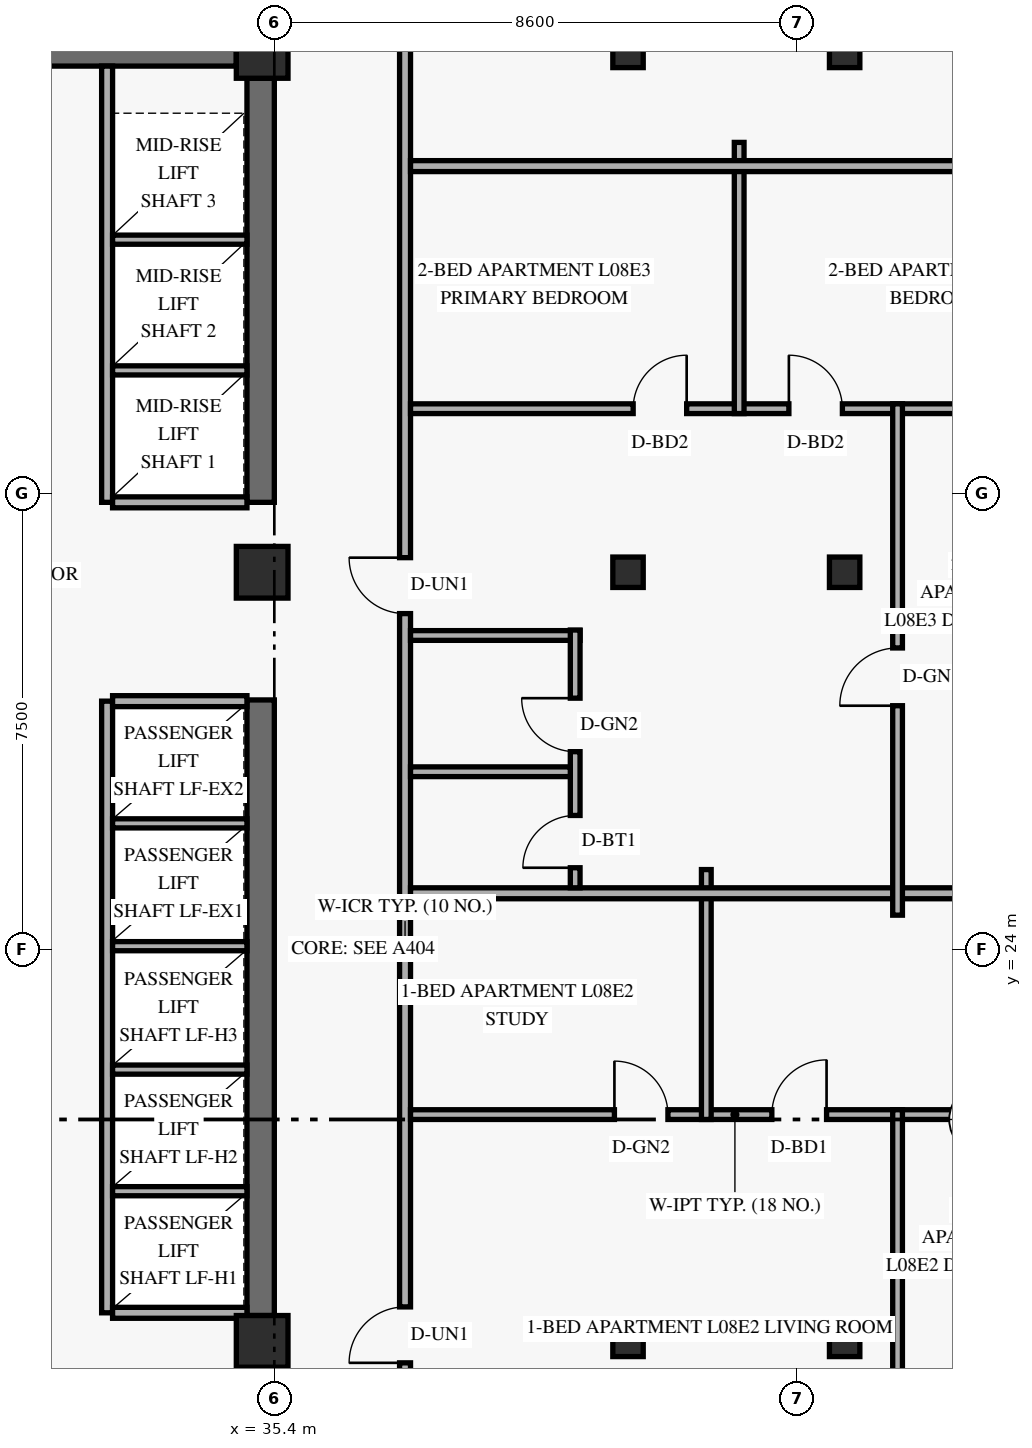
"""IFC4 building model, lengths in metres.
Left out: names, types, materials, properties, quantities, classifications, styles, units other than length and angle.
Written with IfcOpenShell. Run it as: python <this file> out.ifc"""

import sys

from ifc_helpers import new_model, si_unit, direction, frame, frame_2d, origin, origin_2d, place, context, subcontext, project, spatial, rectangle, hollow_rectangle, extrude, element, fill, save


model = new_model("IFC4")
c1 = context("Model", 3, precision=1e-05, world=origin(), true_north=direction((0.0, 1.0)))
c2 = subcontext(c1, "Body", "Model", "MODEL_VIEW")
j1 = project(units=[si_unit("LENGTHUNIT", "METRE"), si_unit("PLANEANGLEUNIT", "RADIAN")], contexts=[c1])
p1 = place(None, origin())
s1 = spatial("IfcSite", under=j1, at=p1, CompositionType="ELEMENT")
p2 = place(p1, origin())
s2 = spatial("IfcBuilding", under=s1, at=p2, CompositionType="ELEMENT")
p3 = place(p2, frame((0.0, 0.0, 34.8)))
s3 = spatial("IfcBuildingStorey", under=s2, at=p3, CompositionType="ELEMENT", Elevation=34.8)
p4 = place(p3, frame((35.175, 17.975, 0.0), z_axis=(0.0, 0.0, 1.0), x_axis=(0.0, 1.0, 0.0)))
e1 = element("IfcWall", 1, at=p4, inside=s3, PredefinedType="SHEAR", context=c2, shape_type="SweptSolid", body=[
    extrude(rectangle(XDim=10.125, YDim=0.45, at=frame_2d((5.062, 0.0))), origin(), (0.0, 0.0, 1.0), 2.667),
])
p5 = place(p3, frame((35.175, 31.35, 0.0), z_axis=(0.0, 0.0, 1.0), x_axis=(0.0, 1.0, 0.0)))
e2 = element("IfcWall", 2, at=p5, inside=s3, PredefinedType="SHEAR", context=c2, shape_type="SweptSolid", body=[
    extrude(rectangle(XDim=6.975, YDim=0.45, at=frame_2d((3.487, 0.0))), origin(), (0.0, 0.0, 1.0), 2.667),
])
p6 = place(p3, frame((24.625, 38.75, 0.0), z_axis=(0.0, 0.0, 1.0), x_axis=(1.0, 0.0, 0.0)))
e3 = element("IfcWall", 3, at=p6, inside=s3, PredefinedType="SHEAR", context=c2, shape_type="SweptSolid", body=[
    extrude(rectangle(XDim=10.15, YDim=0.45, at=frame_2d((5.075, 0.0))), origin(), (0.0, 0.0, 1.0), 3.36),
])
for number, where, z_axis, x_axis in (
    (4, (35.2, 17.55, 0.0), (0.0, 0.0, 1.0), (1.0, 0.0, 0.0)),
    (5, (35.2, 30.2, 0.0), (0.0, 0.0, 1.0), (1.0, 0.0, 0.0)),
    (6, (35.2, 38.75, 0.0), (0.0, 0.0, 1.0), (1.0, 0.0, 0.0)),
):
    element("IfcColumn", number, at=place(p3, frame(where, z_axis=z_axis, x_axis=x_axis)), inside=s3, PredefinedType="COLUMN", context=c2, shape_type="SweptSolid", body=[
        extrude(rectangle(XDim=0.85, YDim=0.85, at=origin_2d()), origin(), (0.0, 0.0, 1.0), 3.6),
    ])
for number, where, z_axis, x_axis in (
    (7, (41.154, 17.55, 0.0), (0.035, 0.0, 0.999), (0.0, 1.0, 0.0)),
    (8, (41.154, 30.2, 0.0), (0.035, 0.0, 0.999), (0.0, 1.0, 0.0)),
    (9, (41.154, 38.75, 0.0), (0.035, 0.0, 0.999), (0.0, 1.0, 0.0)),
):
    element("IfcColumn", number, at=place(p3, frame(where, z_axis=z_axis, x_axis=x_axis)), inside=s3, PredefinedType="COLUMN", context=c2, shape_type="SweptSolid", body=[
        extrude(hollow_rectangle(XDim=0.5, YDim=0.5, WallThickness=0.022, at=origin_2d()), origin(), (0.0, 0.0, 1.0), 3.602),
    ])
for number, where, z_axis, x_axis in (
    (10, (44.675, 17.55, 0.0), (0.058, 0.0, 0.998), (0.0, 1.0, 0.0)),
    (11, (44.675, 30.2, 0.0), (0.058, 0.0, 0.998), (0.0, 1.0, 0.0)),
    (12, (44.675, 38.75, 0.0), (0.058, 0.0, 0.998), (0.0, 1.0, 0.0)),
):
    element("IfcColumn", number, at=place(p3, frame(where, z_axis=z_axis, x_axis=x_axis)), inside=s3, PredefinedType="COLUMN", context=c2, shape_type="SweptSolid", body=[
        extrude(hollow_rectangle(XDim=0.5, YDim=0.5, WallThickness=0.022, at=origin_2d()), origin(), (0.0, 0.0, 1.0), 3.606),
    ])
p7 = place(p3, frame((32.65, 18.02, 0.0), z_axis=(0.0, 0.0, 1.0), x_axis=(0.0, 1.0, 0.0)))
e13 = element("IfcWall", 13, at=p7, inside=s3, PredefinedType="STANDARD", context=c2, shape_type="SweptSolid", body=[
    extrude(rectangle(XDim=10.06, YDim=0.18, at=frame_2d((5.03, 0.0))), origin(), (0.0, 0.0, 1.0), 3.36),
])
for number, where, z_axis, x_axis in (
    (14, (32.74, 18.02, 0.0), (0.0, 0.0, 1.0), (1.0, 0.0, 0.0)),
    (15, (32.74, 28.08, 0.0), (0.0, 0.0, 1.0), (1.0, 0.0, 0.0)),
):
    element("IfcWall", number, at=place(p3, frame(where, z_axis=z_axis, x_axis=x_axis)), inside=s3, PredefinedType="STANDARD", context=c2, shape_type="SweptSolid", body=[
        extrude(rectangle(XDim=2.21, YDim=0.18, at=frame_2d((1.105, 0.0))), origin(), (0.0, 0.0, 1.0), 3.36),
    ])
for number, where, z_axis, x_axis in (
    (16, (32.74, 20.02, 0.0), (0.0, 0.0, 1.0), (1.0, 0.0, 0.0)),
    (17, (32.74, 22.02, 0.0), (0.0, 0.0, 1.0), (1.0, 0.0, 0.0)),
    (18, (32.74, 24.05, 0.0), (0.0, 0.0, 1.0), (1.0, 0.0, 0.0)),
    (19, (32.74, 26.07, 0.0), (0.0, 0.0, 1.0), (1.0, 0.0, 0.0)),
):
    element("IfcWall", number, at=place(p3, frame(where, z_axis=z_axis, x_axis=x_axis)), inside=s3, PredefinedType="STANDARD", context=c2, shape_type="SweptSolid", body=[
        extrude(rectangle(XDim=2.21, YDim=0.15, at=frame_2d((1.105, 0.0))), origin(), (0.0, 0.0, 1.0), 3.36),
    ])
p8 = place(p3, frame((32.65, 31.35, 0.0), z_axis=(0.0, 0.0, 1.0), x_axis=(0.0, 1.0, 0.0)))
e20 = element("IfcWall", 20, at=p8, inside=s3, PredefinedType="STANDARD", context=c2, shape_type="SweptSolid", body=[
    extrude(rectangle(XDim=7.175, YDim=0.18, at=frame_2d((3.587, 0.0))), origin(), (0.0, 0.0, 1.0), 3.36),
])
p9 = place(p3, frame((32.74, 31.35, 0.0), z_axis=(0.0, 0.0, 1.0), x_axis=(1.0, 0.0, 0.0)))
e21 = element("IfcWall", 21, at=p9, inside=s3, PredefinedType="STANDARD", context=c2, shape_type="SweptSolid", body=[
    extrude(rectangle(XDim=2.21, YDim=0.18, at=frame_2d((1.105, 0.0))), origin(), (0.0, 0.0, 1.0), 3.36),
])
for number, where, z_axis, x_axis in (
    (22, (32.74, 33.52, 0.0), (0.0, 0.0, 1.0), (1.0, 0.0, 0.0)),
    (23, (32.74, 35.67, 0.0), (0.0, 0.0, 1.0), (1.0, 0.0, 0.0)),
):
    element("IfcWall", number, at=place(p3, frame(where, z_axis=z_axis, x_axis=x_axis)), inside=s3, PredefinedType="STANDARD", context=c2, shape_type="SweptSolid", body=[
        extrude(rectangle(XDim=2.21, YDim=0.15, at=frame_2d((1.105, 0.0))), origin(), (0.0, 0.0, 1.0), 3.36),
    ])
p10 = place(p3, frame((37.55, 1.29, 0.0), z_axis=(0.0, 0.0, 1.0), x_axis=(0.0, 1.0, 0.0)))
e24 = element("IfcWall", 24, at=p10, inside=s3, PredefinedType="STANDARD", context=c2, shape_type="SweptSolid", body=[
    extrude(rectangle(XDim=45.42, YDim=0.18, at=frame_2d((22.71, 0.0))), origin(), (0.0, 0.0, 1.0), 2.649),
])
p11 = place(p10, frame((4.46, 0.0, 0.0)))
e25 = element("IfcOpeningElement", 25, at=p11, cuts=e24, PredefinedType="OPENING", context=c2, shape_type="SweptSolid", body=[
    extrude(rectangle(XDim=0.92, YDim=2.15, at=frame_2d((0.46, 1.075))), frame((0.0, 0.1, 0.0), z_axis=(0.0, -1.0, 0.0), x_axis=(1.0, 0.0, 0.0)), (0.0, 0.0, 1.0), 0.2),
])
p12 = place(p10, frame((15.907, 0.0, 0.0)))
e26 = element("IfcOpeningElement", 26, at=p12, cuts=e24, PredefinedType="OPENING", context=c2, shape_type="SweptSolid", body=[
    extrude(rectangle(XDim=0.92, YDim=2.15, at=frame_2d((0.46, 1.075))), frame((0.0, 0.1, 0.0), z_axis=(0.0, -1.0, 0.0), x_axis=(1.0, 0.0, 0.0)), (0.0, 0.0, 1.0), 0.2),
])
p13 = place(p10, frame((28.23, 0.0, 0.0)))
e27 = element("IfcOpeningElement", 27, at=p13, cuts=e24, PredefinedType="OPENING", context=c2, shape_type="SweptSolid", body=[
    extrude(rectangle(XDim=0.92, YDim=2.15, at=frame_2d((0.46, 1.075))), frame((0.0, 0.1, 0.0), z_axis=(0.0, -1.0, 0.0), x_axis=(1.0, 0.0, 0.0)), (0.0, 0.0, 1.0), 0.2),
])
p14 = place(p10, frame((40.02, 0.0, 0.0)))
e28 = element("IfcOpeningElement", 28, at=p14, cuts=e24, PredefinedType="OPENING", context=c2, shape_type="SweptSolid", body=[
    extrude(rectangle(XDim=0.92, YDim=2.15, at=frame_2d((0.46, 1.075))), frame((0.0, 0.1, 0.0), z_axis=(0.0, -1.0, 0.0), x_axis=(1.0, 0.0, 0.0)), (0.0, 0.0, 1.0), 0.2),
])
p15 = place(p3, frame((35.42, 38.75, 0.0), z_axis=(0.0, 0.0, 1.0), x_axis=(0.0, 1.0, 0.0)))
e29 = element("IfcWall", 29, at=p15, inside=s3, PredefinedType="STANDARD", context=c2, shape_type="SweptSolid", body=[
    extrude(rectangle(XDim=0.51, YDim=0.18, at=frame_2d((0.255, 0.0))), origin(), (0.0, 0.0, 1.0), 3.36),
])
p16 = place(p3, frame((37.64, 21.28, 0.0), z_axis=(0.0, 0.0, 1.0), x_axis=(1.0, 0.0, 0.0)))
e30 = element("IfcWall", 30, at=p16, inside=s3, PredefinedType="PARTITIONING", context=c2, shape_type="SweptSolid", body=[
    extrude(rectangle(XDim=10.67, YDim=0.16, at=frame_2d((5.335, 0.0))), origin(), (0.0, 0.0, 1.0), 2.649),
])
p17 = place(p16, frame((3.353, 0.0, 0.0)))
e31 = element("IfcOpeningElement", 31, at=p17, cuts=e30, PredefinedType="OPENING", context=c2, shape_type="SweptSolid", body=[
    extrude(rectangle(XDim=0.88, YDim=2.12, at=frame_2d((0.44, 1.06))), frame((0.0, 0.09, 0.0), z_axis=(0.0, -1.0, 0.0), x_axis=(1.0, 0.0, 0.0)), (0.0, 0.0, 1.0), 0.18),
])
p18 = place(p16, frame((5.942, 0.0, 0.0)))
e32 = element("IfcOpeningElement", 32, at=p18, cuts=e30, PredefinedType="OPENING", context=c2, shape_type="SweptSolid", body=[
    extrude(rectangle(XDim=0.9, YDim=2.14, at=frame_2d((0.45, 1.07))), frame((0.0, 0.09, 0.0), z_axis=(0.0, -1.0, 0.0), x_axis=(1.0, 0.0, 0.0)), (0.0, 0.0, 1.0), 0.18),
])
p19 = place(p3, frame((45.65, 11.68, 0.0), z_axis=(0.0, 0.0, 1.0), x_axis=(0.0, 1.0, 0.0)))
e33 = element("IfcWall", 33, at=p19, inside=s3, PredefinedType="PARTITIONING", context=c2, shape_type="SweptSolid", body=[
    extrude(rectangle(XDim=9.68, YDim=0.16, at=frame_2d((4.84, 0.0))), origin(), (0.0, 0.0, 1.0), 3.36),
])
p20 = place(p19, frame((4.08, 0.0, 0.0)))
e34 = element("IfcOpeningElement", 34, at=p20, cuts=e33, PredefinedType="OPENING", context=c2, shape_type="SweptSolid", body=[
    extrude(rectangle(XDim=0.95, YDim=2.15, at=frame_2d((0.475, 1.075))), frame((0.0, 0.09, 0.0), z_axis=(0.0, -1.0, 0.0), x_axis=(1.0, 0.0, 0.0)), (0.0, 0.0, 1.0), 0.18),
])
p21 = place(p3, frame((42.504, 21.2, 0.0), z_axis=(0.0, 0.0, 1.0), x_axis=(0.0, 1.0, 0.0)))
e35 = element("IfcWall", 35, at=p21, inside=s3, PredefinedType="PARTITIONING", context=c2, shape_type="SweptSolid", body=[
    extrude(rectangle(XDim=4.11, YDim=0.16, at=frame_2d((2.055, 0.0))), origin(), (0.0, 0.0, 1.0), 2.932),
])
p22 = place(p3, frame((37.64, 24.92, 0.0), z_axis=(0.0, 0.0, 1.0), x_axis=(1.0, 0.0, 0.0)))
e36 = element("IfcWall", 36, at=p22, inside=s3, PredefinedType="PARTITIONING", context=c2, shape_type="SweptSolid", body=[
    extrude(rectangle(XDim=10.67, YDim=0.18, at=frame_2d((5.335, 0.0))), origin(), (0.0, 0.0, 1.0), 2.649),
])
p23 = place(p3, frame((37.64, 32.89, 0.0), z_axis=(0.0, 0.0, 1.0), x_axis=(1.0, 0.0, 0.0)))
e37 = element("IfcWall", 37, at=p23, inside=s3, PredefinedType="PARTITIONING", context=c2, shape_type="SweptSolid", body=[
    extrude(rectangle(XDim=10.67, YDim=0.16, at=frame_2d((5.335, 0.0))), origin(), (0.0, 0.0, 1.0), 2.649),
])
p24 = place(p23, frame((3.662, 0.0, 0.0)))
e38 = element("IfcOpeningElement", 38, at=p24, cuts=e37, PredefinedType="OPENING", context=c2, shape_type="SweptSolid", body=[
    extrude(rectangle(XDim=0.88, YDim=2.14, at=frame_2d((0.44, 1.07))), frame((0.0, 0.09, 0.0), z_axis=(0.0, -1.0, 0.0), x_axis=(1.0, 0.0, 0.0)), (0.0, 0.0, 1.0), 0.18),
])
p25 = place(p23, frame((6.222, 0.0, 0.0)))
e39 = element("IfcOpeningElement", 39, at=p25, cuts=e37, PredefinedType="OPENING", context=c2, shape_type="SweptSolid", body=[
    extrude(rectangle(XDim=0.88, YDim=2.14, at=frame_2d((0.44, 1.07))), frame((0.0, 0.09, 0.0), z_axis=(0.0, -1.0, 0.0), x_axis=(1.0, 0.0, 0.0)), (0.0, 0.0, 1.0), 0.18),
])
p26 = place(p3, frame((37.64, 29.16, 0.0), z_axis=(0.0, 0.0, 1.0), x_axis=(1.0, 0.0, 0.0)))
e40 = element("IfcWall", 40, at=p26, inside=s3, PredefinedType="PLUMBINGWALL", context=c2, shape_type="SweptSolid", body=[
    extrude(rectangle(XDim=2.788, YDim=0.16, at=frame_2d((1.394, 0.0))), origin(), (0.0, 0.0, 1.0), 3.36),
])
p27 = place(p3, frame((40.348, 25.01, 0.0), z_axis=(0.0, 0.0, 1.0), x_axis=(0.0, 1.0, 0.0)))
e41 = element("IfcWall", 41, at=p27, inside=s3, PredefinedType="PLUMBINGWALL", context=c2, shape_type="SweptSolid", body=[
    extrude(rectangle(XDim=4.24, YDim=0.16, at=frame_2d((2.12, 0.0))), origin(), (0.0, 0.0, 1.0), 3.36),
])
p28 = place(p27, frame((0.33, 0.0, 0.0)))
e42 = element("IfcOpeningElement", 42, at=p28, cuts=e41, PredefinedType="OPENING", context=c2, shape_type="SweptSolid", body=[
    extrude(rectangle(XDim=0.86, YDim=2.12, at=frame_2d((0.43, 1.06))), frame((0.0, 0.09, 0.0), z_axis=(0.0, -1.0, 0.0), x_axis=(1.0, 0.0, 0.0)), (0.0, 0.0, 1.0), 0.18),
])
p29 = place(p27, frame((2.239, 0.0, 0.0)))
e43 = element("IfcOpeningElement", 43, at=p29, cuts=e41, PredefinedType="OPENING", context=c2, shape_type="SweptSolid", body=[
    extrude(rectangle(XDim=0.88, YDim=2.12, at=frame_2d((0.44, 1.06))), frame((0.0, 0.09, 0.0), z_axis=(0.0, -1.0, 0.0), x_axis=(1.0, 0.0, 0.0)), (0.0, 0.0, 1.0), 0.18),
])
p30 = place(p3, frame((37.64, 26.919, 0.0), z_axis=(0.0, 0.0, 1.0), x_axis=(1.0, 0.0, 0.0)))
e44 = element("IfcWall", 44, at=p30, inside=s3, PredefinedType="PLUMBINGWALL", context=c2, shape_type="SweptSolid", body=[
    extrude(rectangle(XDim=2.628, YDim=0.16, at=frame_2d((1.314, 0.0))), origin(), (0.0, 0.0, 1.0), 3.36),
])
p31 = place(p3, frame((45.65, 24.56, 0.0), z_axis=(0.0, 0.0, 1.0), x_axis=(0.0, 1.0, 0.0)))
e45 = element("IfcWall", 45, at=p31, inside=s3, PredefinedType="PARTITIONING", context=c2, shape_type="SweptSolid", body=[
    extrude(rectangle(XDim=8.41, YDim=0.16, at=frame_2d((4.205, 0.0))), origin(), (0.0, 0.0, 1.0), 3.36),
])
p32 = place(p31, frame((3.445, 0.0, 0.0)))
e46 = element("IfcOpeningElement", 46, at=p32, cuts=e45, PredefinedType="OPENING", context=c2, shape_type="SweptSolid", body=[
    extrude(rectangle(XDim=0.95, YDim=2.15, at=frame_2d((0.475, 1.075))), frame((0.0, 0.09, 0.0), z_axis=(0.0, -1.0, 0.0), x_axis=(1.0, 0.0, 0.0)), (0.0, 0.0, 1.0), 0.18),
])
p33 = place(p3, frame((43.045, 32.81, 0.0), z_axis=(0.0, 0.0, 1.0), x_axis=(0.0, 1.0, 0.0)))
e47 = element("IfcWall", 47, at=p33, inside=s3, PredefinedType="PARTITIONING", context=c2, shape_type="SweptSolid", body=[
    extrude(rectangle(XDim=4.46, YDim=0.16, at=frame_2d((2.23, 0.0))), origin(), (0.0, 0.0, 1.0), 2.932),
])
p34 = place(p3, frame((37.64, 36.88, 0.0), z_axis=(0.0, 0.0, 1.0), x_axis=(1.0, 0.0, 0.0)))
e48 = element("IfcWall", 48, at=p34, inside=s3, PredefinedType="PARTITIONING", context=c2, shape_type="SweptSolid", body=[
    extrude(rectangle(XDim=10.67, YDim=0.18, at=frame_2d((5.335, 0.0))), origin(), (0.0, 0.0, 1.0), 2.649),
])
p35 = place(p12, origin())
e49 = element("IfcDoor", 49, at=p35, inside=s3, OperationType="SINGLE_SWING_LEFT", PredefinedType="DOOR", context=c2, shape_type="SweptSolid", body=[
    extrude(rectangle(XDim=0.92, YDim=2.15, at=frame_2d((0.46, 1.075))), frame((0.0, 0.025, 0.0), z_axis=(0.0, -1.0, 0.0), x_axis=(1.0, 0.0, 0.0)), (0.0, 0.0, 1.0), 0.05),
])
fill(e26, e49)
p36 = place(p17, origin())
e50 = element("IfcDoor", 50, at=p36, inside=s3, OperationType="SINGLE_SWING_LEFT", PredefinedType="DOOR", context=c2, shape_type="SweptSolid", body=[
    extrude(rectangle(XDim=0.88, YDim=2.12, at=frame_2d((0.44, 1.06))), frame((0.0, 0.025, 0.0), z_axis=(0.0, -1.0, 0.0), x_axis=(1.0, 0.0, 0.0)), (0.0, 0.0, 1.0), 0.05),
])
fill(e31, e50)
p37 = place(p18, origin())
e51 = element("IfcDoor", 51, at=p37, inside=s3, OperationType="SINGLE_SWING_RIGHT", PredefinedType="DOOR", context=c2, shape_type="SweptSolid", body=[
    extrude(rectangle(XDim=0.9, YDim=2.14, at=frame_2d((0.45, 1.07))), frame((0.0, 0.025, 0.0), z_axis=(0.0, -1.0, 0.0), x_axis=(1.0, 0.0, 0.0)), (0.0, 0.0, 1.0), 0.05),
])
fill(e32, e51)
p38 = place(p32, origin())
e52 = element("IfcDoor", 52, at=p38, inside=s3, OperationType="SINGLE_SWING_LEFT", PredefinedType="DOOR", context=c2, shape_type="SweptSolid", body=[
    extrude(rectangle(XDim=0.95, YDim=2.15, at=frame_2d((0.475, 1.075))), frame((0.0, 0.025, 0.0), z_axis=(0.0, -1.0, 0.0), x_axis=(1.0, 0.0, 0.0)), (0.0, 0.0, 1.0), 0.05),
])
fill(e46, e52)
p39 = place(p13, origin())
e53 = element("IfcDoor", 53, at=p39, inside=s3, OperationType="SINGLE_SWING_RIGHT", PredefinedType="DOOR", context=c2, shape_type="SweptSolid", body=[
    extrude(rectangle(XDim=0.92, YDim=2.15, at=frame_2d((0.46, 1.075))), frame((0.0, 0.025, 0.0), z_axis=(0.0, -1.0, 0.0), x_axis=(1.0, 0.0, 0.0)), (0.0, 0.0, 1.0), 0.05),
])
fill(e27, e53)
p40 = place(p28, origin())
e54 = element("IfcDoor", 54, at=p40, inside=s3, OperationType="SINGLE_SWING_LEFT", PredefinedType="DOOR", context=c2, shape_type="SweptSolid", body=[
    extrude(rectangle(XDim=0.86, YDim=2.12, at=frame_2d((0.43, 1.06))), frame((0.0, 0.025, 0.0), z_axis=(0.0, -1.0, 0.0), x_axis=(1.0, 0.0, 0.0)), (0.0, 0.0, 1.0), 0.05),
])
fill(e42, e54)
p41 = place(p29, origin())
e55 = element("IfcDoor", 55, at=p41, inside=s3, OperationType="SINGLE_SWING_RIGHT", PredefinedType="DOOR", context=c2, shape_type="SweptSolid", body=[
    extrude(rectangle(XDim=0.88, YDim=2.12, at=frame_2d((0.44, 1.06))), frame((0.0, 0.025, 0.0), z_axis=(0.0, -1.0, 0.0), x_axis=(1.0, 0.0, 0.0)), (0.0, 0.0, 1.0), 0.05),
])
fill(e43, e55)
p42 = place(p24, origin())
e56 = element("IfcDoor", 56, at=p42, inside=s3, OperationType="SINGLE_SWING_RIGHT", PredefinedType="DOOR", context=c2, shape_type="SweptSolid", body=[
    extrude(rectangle(XDim=0.88, YDim=2.14, at=frame_2d((0.44, 1.07))), frame((0.0, 0.025, 0.0), z_axis=(0.0, -1.0, 0.0), x_axis=(1.0, 0.0, 0.0)), (0.0, 0.0, 1.0), 0.05),
])
fill(e38, e56)
p43 = place(p25, origin())
e57 = element("IfcDoor", 57, at=p43, inside=s3, OperationType="SINGLE_SWING_LEFT", PredefinedType="DOOR", context=c2, shape_type="SweptSolid", body=[
    extrude(rectangle(XDim=0.88, YDim=2.14, at=frame_2d((0.44, 1.07))), frame((0.0, 0.025, 0.0), z_axis=(0.0, -1.0, 0.0), x_axis=(1.0, 0.0, 0.0)), (0.0, 0.0, 1.0), 0.05),
])
fill(e39, e57)
save(model, sys.argv[1])
